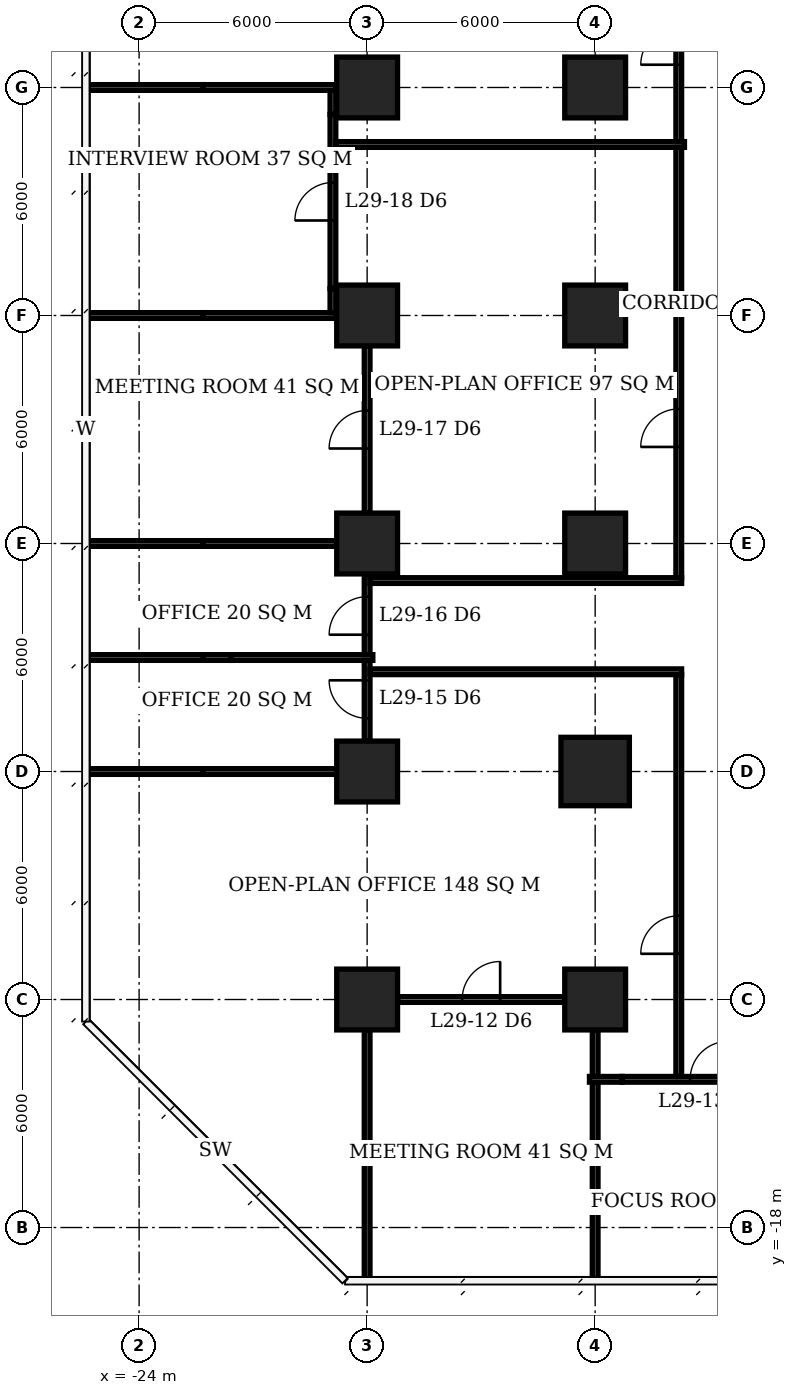
"""IFC4 building model, lengths in metres.
Left out: names, types, materials, properties, quantities, classifications, styles, units other than length and angle.
Written with IfcOpenShell. Run it as: python <this file> out.ifc"""

import sys

from ifc_helpers import new_model, si_unit, direction, frame, frame_2d, origin, origin_2d, place, context, subcontext, project, spatial, rectangle, extrude, element, fill, save


model = new_model("IFC4")
c1 = context("Model", 3, precision=1e-05, world=origin(), true_north=direction((0.0, 1.0)))
c2 = subcontext(c1, "Body", "Model", "MODEL_VIEW")
j1 = project(units=[si_unit("LENGTHUNIT", "METRE"), si_unit("PLANEANGLEUNIT", "RADIAN")], contexts=[c1])
p1 = place(None, origin())
s1 = spatial("IfcSite", under=j1, at=p1, CompositionType="ELEMENT")
p2 = place(p1, origin())
s2 = spatial("IfcBuilding", under=s1, at=p2, CompositionType="ELEMENT")
p3 = place(p2, frame((0.0, 0.0, 121.1)))
s3 = spatial("IfcBuildingStorey", under=s2, at=p3, CompositionType="ELEMENT", Elevation=121.1)
for number, where, z_axis, x_axis in (
    (1, (-18.0, -12.0, 0.0), (0.0, 0.0, 1.0), (1.0, 0.0, 0.0)),
    (2, (-18.0, -6.0, 0.0), (0.0, 0.0, 1.0), (1.0, 0.0, 0.0)),
    (3, (-18.0, 0.0, 0.0), (0.0, 0.0, 1.0), (1.0, 0.0, 0.0)),
    (4, (-18.0, 6.0, 0.0), (0.0, 0.0, 1.0), (1.0, 0.0, 0.0)),
    (5, (-18.0, 12.0, 0.0), (0.0, 0.0, 1.0), (1.0, 0.0, 0.0)),
    (6, (-12.0, -12.0, 0.0), (0.0, 0.0, 1.0), (1.0, 0.0, 0.0)),
):
    element("IfcColumn", number, at=place(p3, frame(where, z_axis=z_axis, x_axis=x_axis)), inside=s3, PredefinedType="COLUMN", context=c2, shape_type="SweptSolid", body=[
        extrude(rectangle(XDim=1.6, YDim=1.6, at=origin_2d()), origin(), (0.0, 0.0, 1.0), 3.9),
    ])
p4 = place(p3, frame((-12.0, -6.0, 0.0), z_axis=(0.0, 0.0, 1.0), x_axis=(1.0, 0.0, 0.0)))
e7 = element("IfcColumn", 7, at=p4, inside=s3, PredefinedType="COLUMN", context=c2, shape_type="SweptSolid", body=[
    extrude(rectangle(XDim=1.8, YDim=1.8, at=origin_2d()), origin(), (0.0, 0.0, 1.0), 3.9),
])
for number, where, z_axis, x_axis in (
    (8, (-12.0, 0.0, 0.0), (0.0, 0.0, 1.0), (1.0, 0.0, 0.0)),
    (9, (-12.0, 6.0, 0.0), (0.0, 0.0, 1.0), (1.0, 0.0, 0.0)),
    (10, (-12.0, 12.0, 0.0), (0.0, 0.0, 1.0), (1.0, 0.0, 0.0)),
):
    element("IfcColumn", number, at=place(p3, frame(where, z_axis=z_axis, x_axis=x_axis)), inside=s3, PredefinedType="COLUMN", context=c2, shape_type="SweptSolid", body=[
        extrude(rectangle(XDim=1.6, YDim=1.6, at=origin_2d()), origin(), (0.0, 0.0, 1.0), 3.9),
    ])
p5 = place(p3, frame((-12.15, -14.1, 0.0), z_axis=(0.0, 0.0, 1.0), x_axis=(1.0, 0.0, 0.0)))
e11 = element("IfcWall", 11, at=p5, inside=s3, PredefinedType="PARTITIONING", context=c2, shape_type="SweptSolid", body=[
    extrude(rectangle(XDim=0.86, YDim=0.15, at=frame_2d((0.43, 0.0))), origin(), (0.0, 0.0, 1.0), 2.65),
])
p6 = place(p3, frame((-11.29, -14.1, 0.0), z_axis=(0.0, 0.0, 1.0), x_axis=(1.0, 0.0, 0.0)))
e12 = element("IfcWall", 12, at=p6, inside=s3, PredefinedType="PARTITIONING", context=c2, shape_type="SweptSolid", body=[
    extrude(rectangle(XDim=4.58, YDim=0.15, at=frame_2d((2.29, 0.0))), origin(), (0.0, 0.0, 1.0), 3.65),
])
p7 = place(p6, frame((1.79, 0.0, 0.0)))
e13 = element("IfcOpeningElement", 13, at=p7, cuts=e12, PredefinedType="OPENING", context=c2, shape_type="SweptSolid", body=[
    extrude(rectangle(XDim=1.0, YDim=2.1, at=frame_2d((0.5, 1.05))), frame((0.0, 0.085, 0.0), z_axis=(0.0, -1.0, 0.0), x_axis=(1.0, 0.0, 0.0)), (0.0, 0.0, 1.0), 0.17),
])
p8 = place(p3, frame((-17.2, -12.0, 0.0), z_axis=(0.0, 0.0, 1.0), x_axis=(1.0, 0.0, 0.0)))
e14 = element("IfcWall", 14, at=p8, inside=s3, PredefinedType="PARTITIONING", context=c2, shape_type="SweptSolid", body=[
    extrude(rectangle(XDim=4.4, YDim=0.15, at=frame_2d((2.2, 0.0))), origin(), (0.0, 0.0, 1.0), 3.65),
])
p9 = place(p8, frame((1.7, 0.0, 0.0)))
e15 = element("IfcOpeningElement", 15, at=p9, cuts=e14, PredefinedType="OPENING", context=c2, shape_type="SweptSolid", body=[
    extrude(rectangle(XDim=1.0, YDim=2.1, at=frame_2d((0.5, 1.05))), frame((0.0, 0.085, 0.0), z_axis=(0.0, -1.0, 0.0), x_axis=(1.0, 0.0, 0.0)), (0.0, 0.0, 1.0), 0.17),
])
p10 = place(p3, frame((-25.4, -6.0, 0.0), z_axis=(0.0, 0.0, 1.0), x_axis=(1.0, 0.0, 0.0)))
e16 = element("IfcWall", 16, at=p10, inside=s3, PredefinedType="PARTITIONING", context=c2, shape_type="SweptSolid", body=[
    extrude(rectangle(XDim=3.09, YDim=0.15, at=frame_2d((1.545, 0.0))), origin(), (0.0, 0.0, 1.0), 3.65),
])
p11 = place(p3, frame((-22.31, -6.0, 0.0), z_axis=(0.0, 0.0, 1.0), x_axis=(1.0, 0.0, 0.0)))
e17 = element("IfcWall", 17, at=p11, inside=s3, PredefinedType="PARTITIONING", context=c2, shape_type="SweptSolid", body=[
    extrude(rectangle(XDim=3.51, YDim=0.15, at=frame_2d((1.755, 0.0))), origin(), (0.0, 0.0, 1.0), 2.65),
])
p12 = place(p3, frame((-25.4, -3.0, 0.0), z_axis=(0.0, 0.0, 1.0), x_axis=(1.0, 0.0, 0.0)))
e18 = element("IfcWall", 18, at=p12, inside=s3, PredefinedType="PARTITIONING", context=c2, shape_type="SweptSolid", body=[
    extrude(rectangle(XDim=3.09, YDim=0.15, at=frame_2d((1.545, 0.0))), origin(), (0.0, 0.0, 1.0), 3.65),
])
p13 = place(p3, frame((-22.31, -3.0, 0.0), z_axis=(0.0, 0.0, 1.0), x_axis=(1.0, 0.0, 0.0)))
e19 = element("IfcWall", 19, at=p13, inside=s3, PredefinedType="PARTITIONING", context=c2, shape_type="SweptSolid", body=[
    extrude(rectangle(XDim=0.72, YDim=0.15, at=frame_2d((0.36, 0.0))), origin(), (0.0, 0.0, 1.0), 2.65),
])
p14 = place(p3, frame((-21.59, -3.0, 0.0), z_axis=(0.0, 0.0, 1.0), x_axis=(1.0, 0.0, 0.0)))
e20 = element("IfcWall", 20, at=p14, inside=s3, PredefinedType="PARTITIONING", context=c2, shape_type="SweptSolid", body=[
    extrude(rectangle(XDim=3.74, YDim=0.15, at=frame_2d((1.87, 0.0))), origin(), (0.0, 0.0, 1.0), 3.65),
])
p15 = place(p3, frame((-25.35, 0.0, 0.0), z_axis=(0.0, 0.0, 1.0), x_axis=(1.0, 0.0, 0.0)))
e21 = element("IfcWall", 21, at=p15, inside=s3, PredefinedType="PARTITIONING", context=c2, shape_type="SweptSolid", body=[
    extrude(rectangle(XDim=3.04, YDim=0.15, at=frame_2d((1.52, 0.0))), origin(), (0.0, 0.0, 1.0), 3.65),
])
p16 = place(p3, frame((-22.31, 0.0, 0.0), z_axis=(0.0, 0.0, 1.0), x_axis=(1.0, 0.0, 0.0)))
e22 = element("IfcWall", 22, at=p16, inside=s3, PredefinedType="PARTITIONING", context=c2, shape_type="SweptSolid", body=[
    extrude(rectangle(XDim=3.51, YDim=0.15, at=frame_2d((1.755, 0.0))), origin(), (0.0, 0.0, 1.0), 2.65),
])
p17 = place(p3, frame((-25.35, 6.0, 0.0), z_axis=(0.0, 0.0, 1.0), x_axis=(1.0, 0.0, 0.0)))
e23 = element("IfcWall", 23, at=p17, inside=s3, PredefinedType="PARTITIONING", context=c2, shape_type="SweptSolid", body=[
    extrude(rectangle(XDim=3.04, YDim=0.15, at=frame_2d((1.52, 0.0))), origin(), (0.0, 0.0, 1.0), 3.65),
])
p18 = place(p3, frame((-22.31, 6.0, 0.0), z_axis=(0.0, 0.0, 1.0), x_axis=(1.0, 0.0, 0.0)))
e24 = element("IfcWall", 24, at=p18, inside=s3, PredefinedType="PARTITIONING", context=c2, shape_type="SweptSolid", body=[
    extrude(rectangle(XDim=3.485, YDim=0.15, at=frame_2d((1.743, 0.0))), origin(), (0.0, 0.0, 1.0), 2.65),
])
p19 = place(p3, frame((-25.4, 12.0, 0.0), z_axis=(0.0, 0.0, 1.0), x_axis=(1.0, 0.0, 0.0)))
e25 = element("IfcWall", 25, at=p19, inside=s3, PredefinedType="PARTITIONING", context=c2, shape_type="SweptSolid", body=[
    extrude(rectangle(XDim=3.09, YDim=0.15, at=frame_2d((1.545, 0.0))), origin(), (0.0, 0.0, 1.0), 3.65),
])
p20 = place(p3, frame((-22.31, 12.0, 0.0), z_axis=(0.0, 0.0, 1.0), x_axis=(1.0, 0.0, 0.0)))
e26 = element("IfcWall", 26, at=p20, inside=s3, PredefinedType="PARTITIONING", context=c2, shape_type="SweptSolid", body=[
    extrude(rectangle(XDim=3.485, YDim=0.15, at=frame_2d((1.743, 0.0))), origin(), (0.0, 0.0, 1.0), 2.65),
])
p21 = place(p3, frame((-18.9, 6.075, 0.0), z_axis=(0.0, 0.0, 1.0), x_axis=(0.0, 1.0, 0.0)))
e27 = element("IfcWall", 27, at=p21, inside=s3, PredefinedType="PARTITIONING", context=c2, shape_type="SweptSolid", body=[
    extrude(rectangle(XDim=0.635, YDim=0.15, at=frame_2d((0.317, 0.0))), origin(), (0.0, 0.0, 1.0), 2.65),
])
p22 = place(p3, frame((-18.9, 6.71, 0.0), z_axis=(0.0, 0.0, 1.0), x_axis=(0.0, 1.0, 0.0)))
e28 = element("IfcWall", 28, at=p22, inside=s3, PredefinedType="PARTITIONING", context=c2, shape_type="SweptSolid", body=[
    extrude(rectangle(XDim=4.58, YDim=0.15, at=frame_2d((2.29, 0.0))), origin(), (0.0, 0.0, 1.0), 3.65),
])
p23 = place(p22, frame((1.79, 0.0, 0.0)))
e29 = element("IfcOpeningElement", 29, at=p23, cuts=e28, PredefinedType="OPENING", context=c2, shape_type="SweptSolid", body=[
    extrude(rectangle(XDim=1.0, YDim=2.1, at=frame_2d((0.5, 1.05))), frame((0.0, 0.085, 0.0), z_axis=(0.0, -1.0, 0.0), x_axis=(1.0, 0.0, 0.0)), (0.0, 0.0, 1.0), 0.17),
])
p24 = place(p3, frame((-18.9, 11.29, 0.0), z_axis=(0.0, 0.0, 1.0), x_axis=(0.0, 1.0, 0.0)))
e30 = element("IfcWall", 30, at=p24, inside=s3, PredefinedType="PARTITIONING", context=c2, shape_type="SweptSolid", body=[
    extrude(rectangle(XDim=0.635, YDim=0.15, at=frame_2d((0.317, 0.0))), origin(), (0.0, 0.0, 1.0), 2.65),
])
p25 = place(p3, frame((-18.0, -19.4, 0.0), z_axis=(0.0, 0.0, 1.0), x_axis=(0.0, 1.0, 0.0)))
e31 = element("IfcWall", 31, at=p25, inside=s3, PredefinedType="PARTITIONING", context=c2, shape_type="SweptSolid", body=[
    extrude(rectangle(XDim=3.09, YDim=0.15, at=frame_2d((1.545, 0.0))), origin(), (0.0, 0.0, 1.0), 3.65),
])
p26 = place(p3, frame((-18.0, -16.31, 0.0), z_axis=(0.0, 0.0, 1.0), x_axis=(0.0, 1.0, 0.0)))
e32 = element("IfcWall", 32, at=p26, inside=s3, PredefinedType="PARTITIONING", context=c2, shape_type="SweptSolid", body=[
    extrude(rectangle(XDim=3.51, YDim=0.15, at=frame_2d((1.755, 0.0))), origin(), (0.0, 0.0, 1.0), 2.65),
])
p27 = place(p3, frame((-18.0, -5.2, 0.0), z_axis=(0.0, 0.0, 1.0), x_axis=(0.0, 1.0, 0.0)))
e33 = element("IfcWall", 33, at=p27, inside=s3, PredefinedType="PARTITIONING", context=c2, shape_type="SweptSolid", body=[
    extrude(rectangle(XDim=2.125, YDim=0.15, at=frame_2d((1.062, 0.0))), origin(), (0.0, 0.0, 1.0), 3.65),
])
p28 = place(p27, frame((0.6, 0.0, 0.0)))
e34 = element("IfcOpeningElement", 34, at=p28, cuts=e33, PredefinedType="OPENING", context=c2, shape_type="SweptSolid", body=[
    extrude(rectangle(XDim=1.0, YDim=2.1, at=frame_2d((0.5, 1.05))), frame((0.0, 0.085, 0.0), z_axis=(0.0, -1.0, 0.0), x_axis=(1.0, 0.0, 0.0)), (0.0, 0.0, 1.0), 0.17),
])
p29 = place(p3, frame((-18.0, -2.925, 0.0), z_axis=(0.0, 0.0, 1.0), x_axis=(0.0, 1.0, 0.0)))
e35 = element("IfcWall", 35, at=p29, inside=s3, PredefinedType="PARTITIONING", context=c2, shape_type="SweptSolid", body=[
    extrude(rectangle(XDim=2.125, YDim=0.15, at=frame_2d((1.062, 0.0))), origin(), (0.0, 0.0, 1.0), 3.65),
])
p30 = place(p29, frame((0.525, 0.0, 0.0)))
e36 = element("IfcOpeningElement", 36, at=p30, cuts=e35, PredefinedType="OPENING", context=c2, shape_type="SweptSolid", body=[
    extrude(rectangle(XDim=1.0, YDim=2.1, at=frame_2d((0.5, 1.05))), frame((0.0, 0.085, 0.0), z_axis=(0.0, -1.0, 0.0), x_axis=(1.0, 0.0, 0.0)), (0.0, 0.0, 1.0), 0.17),
])
p31 = place(p3, frame((-18.0, 0.8, 0.0), z_axis=(0.0, 0.0, 1.0), x_axis=(0.0, 1.0, 0.0)))
e37 = element("IfcWall", 37, at=p31, inside=s3, PredefinedType="PARTITIONING", context=c2, shape_type="SweptSolid", body=[
    extrude(rectangle(XDim=4.4, YDim=0.15, at=frame_2d((2.2, 0.0))), origin(), (0.0, 0.0, 1.0), 3.65),
])
p32 = place(p31, frame((1.7, 0.0, 0.0)))
e38 = element("IfcOpeningElement", 38, at=p32, cuts=e37, PredefinedType="OPENING", context=c2, shape_type="SweptSolid", body=[
    extrude(rectangle(XDim=1.0, YDim=2.1, at=frame_2d((0.5, 1.05))), frame((0.0, 0.085, 0.0), z_axis=(0.0, -1.0, 0.0), x_axis=(1.0, 0.0, 0.0)), (0.0, 0.0, 1.0), 0.17),
])
p33 = place(p3, frame((-12.0, -19.4, 0.0), z_axis=(0.0, 0.0, 1.0), x_axis=(0.0, 1.0, 0.0)))
e39 = element("IfcWall", 39, at=p33, inside=s3, PredefinedType="PARTITIONING", context=c2, shape_type="SweptSolid", body=[
    extrude(rectangle(XDim=3.09, YDim=0.15, at=frame_2d((1.545, 0.0))), origin(), (0.0, 0.0, 1.0), 3.65),
])
p34 = place(p3, frame((-12.0, -16.31, 0.0), z_axis=(0.0, 0.0, 1.0), x_axis=(0.0, 1.0, 0.0)))
e40 = element("IfcWall", 40, at=p34, inside=s3, PredefinedType="PARTITIONING", context=c2, shape_type="SweptSolid", body=[
    extrude(rectangle(XDim=2.135, YDim=0.15, at=frame_2d((1.067, 0.0))), origin(), (0.0, 0.0, 1.0), 2.65),
])
p35 = place(p3, frame((-12.0, -14.025, 0.0), z_axis=(0.0, 0.0, 1.0), x_axis=(0.0, 1.0, 0.0)))
e41 = element("IfcWall", 41, at=p35, inside=s3, PredefinedType="PARTITIONING", context=c2, shape_type="SweptSolid", body=[
    extrude(rectangle(XDim=1.225, YDim=0.15, at=frame_2d((0.612, 0.0))), origin(), (0.0, 0.0, 1.0), 2.65),
])
p36 = place(p3, frame((-18.825, 10.5, 0.0), z_axis=(0.0, 0.0, 1.0), x_axis=(1.0, 0.0, 0.0)))
e42 = element("IfcWall", 42, at=p36, inside=s3, PredefinedType="PARTITIONING", context=c2, shape_type="SweptSolid", body=[
    extrude(rectangle(XDim=9.175, YDim=0.15, at=frame_2d((4.587, 0.0))), origin(), (0.0, 0.0, 1.0), 3.65),
])
for number, where, z_axis, x_axis in (
    (43, (-17.925, -3.375, 0.0), (0.0, 0.0, 1.0), (1.0, 0.0, 0.0)),
    (44, (-17.925, -0.975, 0.0), (0.0, 0.0, 1.0), (1.0, 0.0, 0.0)),
):
    element("IfcWall", number, at=place(p3, frame(where, z_axis=z_axis, x_axis=x_axis)), inside=s3, PredefinedType="PARTITIONING", context=c2, shape_type="SweptSolid", body=[
        extrude(rectangle(XDim=8.2, YDim=0.15, at=frame_2d((4.1, 0.0))), origin(), (0.0, 0.0, 1.0), 3.65),
    ])
p37 = place(p3, frame((-9.8, -14.025, 0.0), z_axis=(0.0, 0.0, 1.0), x_axis=(0.0, 1.0, 0.0)))
e45 = element("IfcWall", 45, at=p37, inside=s3, PredefinedType="PARTITIONING", context=c2, shape_type="SweptSolid", body=[
    extrude(rectangle(XDim=10.575, YDim=0.15, at=frame_2d((5.288, 0.0))), origin(), (0.0, 0.0, 1.0), 3.65),
])
p38 = place(p37, frame((3.228, 0.0, 0.0)))
e46 = element("IfcOpeningElement", 46, at=p38, cuts=e45, PredefinedType="OPENING", context=c2, shape_type="SweptSolid", body=[
    extrude(rectangle(XDim=1.0, YDim=2.1, at=frame_2d((0.5, 1.05))), frame((0.0, 0.085, 0.0), z_axis=(0.0, -1.0, 0.0), x_axis=(1.0, 0.0, 0.0)), (0.0, 0.0, 1.0), 0.17),
])
p39 = place(p3, frame((-9.8, -0.9, 0.0), z_axis=(0.0, 0.0, 1.0), x_axis=(0.0, 1.0, 0.0)))
e47 = element("IfcWall", 47, at=p39, inside=s3, PredefinedType="PARTITIONING", context=c2, shape_type="SweptSolid", body=[
    extrude(rectangle(XDim=11.325, YDim=0.15, at=frame_2d((5.663, 0.0))), origin(), (0.0, 0.0, 1.0), 3.65),
])
p40 = place(p39, frame((3.441, 0.0, 0.0)))
e48 = element("IfcOpeningElement", 48, at=p40, cuts=e47, PredefinedType="OPENING", context=c2, shape_type="SweptSolid", body=[
    extrude(rectangle(XDim=1.0, YDim=2.1, at=frame_2d((0.5, 1.05))), frame((0.0, 0.085, 0.0), z_axis=(0.0, -1.0, 0.0), x_axis=(1.0, 0.0, 0.0)), (0.0, 0.0, 1.0), 0.17),
])
p41 = place(p3, frame((-9.8, 10.575, 0.0), z_axis=(0.0, 0.0, 1.0), x_axis=(0.0, 1.0, 0.0)))
e49 = element("IfcWall", 49, at=p41, inside=s3, PredefinedType="PARTITIONING", context=c2, shape_type="SweptSolid", body=[
    extrude(rectangle(XDim=7.35, YDim=0.15, at=frame_2d((3.675, 0.0))), origin(), (0.0, 0.0, 1.0), 3.65),
])
p42 = place(p41, frame((2.024, 0.0, 0.0)))
e50 = element("IfcOpeningElement", 50, at=p42, cuts=e49, PredefinedType="OPENING", context=c2, shape_type="SweptSolid", body=[
    extrude(rectangle(XDim=1.0, YDim=2.1, at=frame_2d((0.5, 1.05))), frame((0.0, 0.085, 0.0), z_axis=(0.0, -1.0, 0.0), x_axis=(1.0, 0.0, 0.0)), (0.0, 0.0, 1.0), 0.17),
])
p43 = place(p9, origin())
e51 = element("IfcDoor", 51, at=p43, inside=s3, OperationType="SINGLE_SWING_RIGHT", PredefinedType="DOOR", context=c2, shape_type="SweptSolid", body=[
    extrude(rectangle(XDim=1.0, YDim=2.1, at=frame_2d((0.5, 1.05))), frame((0.0, 0.025, 0.0), z_axis=(0.0, -1.0, 0.0), x_axis=(1.0, 0.0, 0.0)), (0.0, 0.0, 1.0), 0.05),
])
fill(e15, e51)
p44 = place(p7, origin())
e52 = element("IfcDoor", 52, at=p44, inside=s3, OperationType="SINGLE_SWING_RIGHT", PredefinedType="DOOR", context=c2, shape_type="SweptSolid", body=[
    extrude(rectangle(XDim=1.0, YDim=2.1, at=frame_2d((0.5, 1.05))), frame((0.0, 0.025, 0.0), z_axis=(0.0, -1.0, 0.0), x_axis=(1.0, 0.0, 0.0)), (0.0, 0.0, 1.0), 0.05),
])
fill(e13, e52)
p45 = place(p28, origin())
e53 = element("IfcDoor", 53, at=p45, inside=s3, OperationType="SINGLE_SWING_RIGHT", PredefinedType="DOOR", context=c2, shape_type="SweptSolid", body=[
    extrude(rectangle(XDim=1.0, YDim=2.1, at=frame_2d((0.5, 1.05))), frame((0.0, 0.025, 0.0), z_axis=(0.0, -1.0, 0.0), x_axis=(1.0, 0.0, 0.0)), (0.0, 0.0, 1.0), 0.05),
])
fill(e34, e53)
p46 = place(p30, origin())
e54 = element("IfcDoor", 54, at=p46, inside=s3, OperationType="SINGLE_SWING_LEFT", PredefinedType="DOOR", context=c2, shape_type="SweptSolid", body=[
    extrude(rectangle(XDim=1.0, YDim=2.1, at=frame_2d((0.5, 1.05))), frame((0.0, 0.025, 0.0), z_axis=(0.0, -1.0, 0.0), x_axis=(1.0, 0.0, 0.0)), (0.0, 0.0, 1.0), 0.05),
])
fill(e36, e54)
p47 = place(p32, origin())
e55 = element("IfcDoor", 55, at=p47, inside=s3, OperationType="SINGLE_SWING_LEFT", PredefinedType="DOOR", context=c2, shape_type="SweptSolid", body=[
    extrude(rectangle(XDim=1.0, YDim=2.1, at=frame_2d((0.5, 1.05))), frame((0.0, 0.025, 0.0), z_axis=(0.0, -1.0, 0.0), x_axis=(1.0, 0.0, 0.0)), (0.0, 0.0, 1.0), 0.05),
])
fill(e38, e55)
p48 = place(p23, origin())
e56 = element("IfcDoor", 56, at=p48, inside=s3, OperationType="SINGLE_SWING_LEFT", PredefinedType="DOOR", context=c2, shape_type="SweptSolid", body=[
    extrude(rectangle(XDim=1.0, YDim=2.1, at=frame_2d((0.5, 1.05))), frame((0.0, 0.025, 0.0), z_axis=(0.0, -1.0, 0.0), x_axis=(1.0, 0.0, 0.0)), (0.0, 0.0, 1.0), 0.05),
])
fill(e29, e56)
p49 = place(p38, origin())
e57 = element("IfcDoor", 57, at=p49, inside=s3, OperationType="SINGLE_SWING_LEFT", PredefinedType="DOOR", context=c2, shape_type="SweptSolid", body=[
    extrude(rectangle(XDim=1.0, YDim=2.1, at=frame_2d((0.5, 1.05))), frame((0.0, 0.025, 0.0), z_axis=(0.0, -1.0, 0.0), x_axis=(1.0, 0.0, 0.0)), (0.0, 0.0, 1.0), 0.05),
])
fill(e46, e57)
p50 = place(p40, origin())
e58 = element("IfcDoor", 58, at=p50, inside=s3, OperationType="SINGLE_SWING_LEFT", PredefinedType="DOOR", context=c2, shape_type="SweptSolid", body=[
    extrude(rectangle(XDim=1.0, YDim=2.1, at=frame_2d((0.5, 1.05))), frame((0.0, 0.025, 0.0), z_axis=(0.0, -1.0, 0.0), x_axis=(1.0, 0.0, 0.0)), (0.0, 0.0, 1.0), 0.05),
])
fill(e48, e58)
p51 = place(p42, origin())
e59 = element("IfcDoor", 59, at=p51, inside=s3, OperationType="SINGLE_SWING_LEFT", PredefinedType="DOOR", context=c2, shape_type="SweptSolid", body=[
    extrude(rectangle(XDim=1.0, YDim=2.1, at=frame_2d((0.5, 1.05))), frame((0.0, 0.025, 0.0), z_axis=(0.0, -1.0, 0.0), x_axis=(1.0, 0.0, 0.0)), (0.0, 0.0, 1.0), 0.05),
])
fill(e50, e59)
save(model, sys.argv[1])
